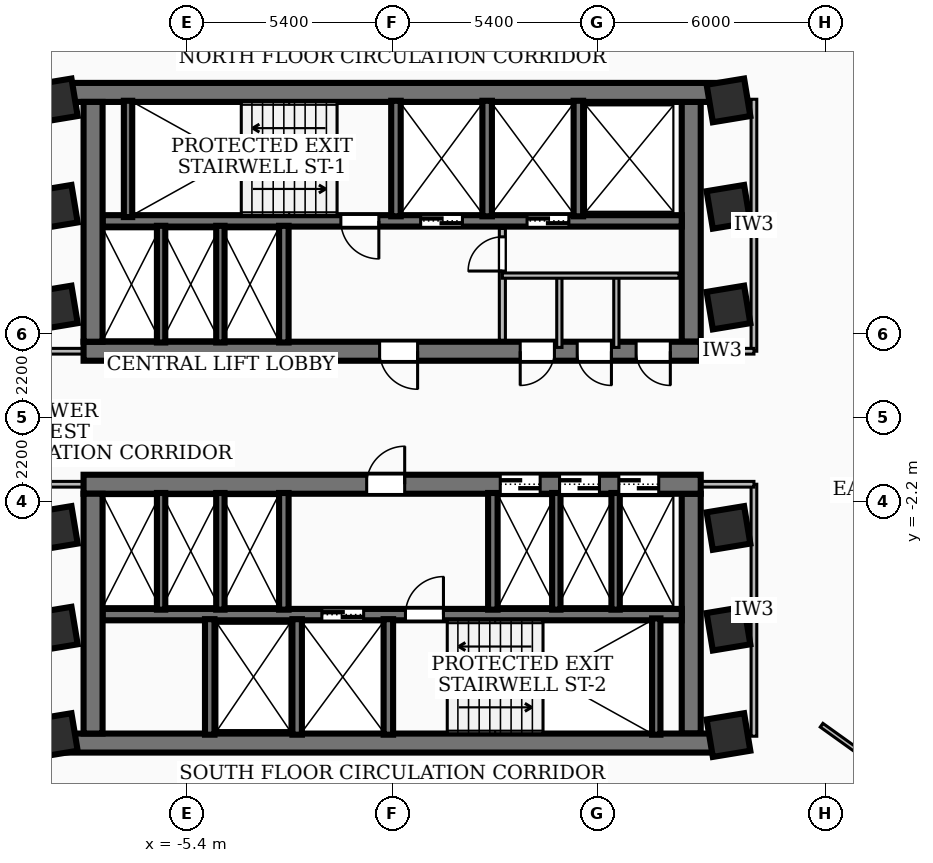
"""IFC4 building model, lengths in metres.
Left out: names, types, materials, properties, quantities, classifications, styles, units other than length and angle.
Written with IfcOpenShell. Run it as: python <this file> out.ifc"""

import sys

from ifc_helpers import new_model, si_unit, direction, frame, frame_2d, origin, origin_2d, place, context, subcontext, project, spatial, rectangle, extrude, element, fill, save


model = new_model("IFC4")
c1 = context("Model", 3, precision=1e-05, world=origin(), true_north=direction((0.0, 1.0)))
c2 = subcontext(c1, "Body", "Model", "MODEL_VIEW")
j1 = project(units=[si_unit("LENGTHUNIT", "METRE"), si_unit("PLANEANGLEUNIT", "RADIAN")], contexts=[c1])
p1 = place(None, origin())
s1 = spatial("IfcSite", under=j1, at=p1, CompositionType="ELEMENT")
p2 = place(p1, origin())
s2 = spatial("IfcBuilding", under=s1, at=p2, CompositionType="ELEMENT")
p3 = place(p2, frame((0.0, 0.0, 92.88)))
s3 = spatial("IfcBuildingStorey", under=s2, at=p3, CompositionType="ELEMENT", Elevation=92.88)
p4 = place(p3, frame((-8.78, 8.56, 0.0), z_axis=(0.0, 0.0, 1.0), x_axis=(1.0, 0.0, 0.0)))
e1 = element("IfcWall", 1, at=p4, inside=s3, PredefinedType="SHEAR", context=c2, shape_type="SweptSolid", body=[
    extrude(rectangle(XDim=17.56, YDim=0.5, at=frame_2d((8.78, 0.0))), origin(), (0.0, 0.0, 1.0), 3.34),
])
p5 = place(p3, frame((8.12, 1.75, 0.0), z_axis=(0.0, 0.0, 1.0), x_axis=(-1.0, 0.0, 0.0)))
e2 = element("IfcWall", 2, at=p5, inside=s3, PredefinedType="SHEAR", context=c2, shape_type="SweptSolid", body=[
    extrude(rectangle(XDim=16.24, YDim=0.5, at=frame_2d((8.12, 0.0))), origin(), (0.0, 0.0, 1.0), 3.34),
])
p6 = place(p5, frame((7.45, 0.0, 0.0)))
e3 = element("IfcOpeningElement", 3, at=p6, cuts=e2, PredefinedType="OPENING", context=c2, shape_type="SweptSolid", body=[
    extrude(rectangle(XDim=1.0, YDim=2.1, at=frame_2d((0.5, 1.05))), frame((0.0, 0.26, 0.0), z_axis=(0.0, -1.0, 0.0), x_axis=(1.0, 0.0, 0.0)), (0.0, 0.0, 1.0), 0.52),
])
p7 = place(p5, frame((3.85, 0.0, 0.0)))
e4 = element("IfcOpeningElement", 4, at=p7, cuts=e2, PredefinedType="OPENING", context=c2, shape_type="SweptSolid", body=[
    extrude(rectangle(XDim=0.9, YDim=2.06, at=frame_2d((0.45, 1.03))), frame((0.0, 0.26, 0.0), z_axis=(0.0, -1.0, 0.0), x_axis=(1.0, 0.0, 0.0)), (0.0, 0.0, 1.0), 0.52),
])
p8 = place(p5, frame((2.35, 0.0, 0.0)))
e5 = element("IfcOpeningElement", 5, at=p8, cuts=e2, PredefinedType="OPENING", context=c2, shape_type="SweptSolid", body=[
    extrude(rectangle(XDim=0.9, YDim=2.06, at=frame_2d((0.45, 1.03))), frame((0.0, 0.26, 0.0), z_axis=(0.0, -1.0, 0.0), x_axis=(1.0, 0.0, 0.0)), (0.0, 0.0, 1.0), 0.52),
])
p9 = place(p5, frame((0.8, 0.0, 0.0)))
e6 = element("IfcOpeningElement", 6, at=p9, cuts=e2, PredefinedType="OPENING", context=c2, shape_type="SweptSolid", body=[
    extrude(rectangle(XDim=0.9, YDim=2.06, at=frame_2d((0.45, 1.03))), frame((0.0, 0.26, 0.0), z_axis=(0.0, -1.0, 0.0), x_axis=(1.0, 0.0, 0.0)), (0.0, 0.0, 1.0), 0.52),
])
for number, where, z_axis, x_axis in (
    (7, (-7.87, 2.0, 0.0), (0.0, 0.0, 1.0), (0.0, 1.0, 0.0)),
    (8, (7.87, 8.31, 0.0), (0.0, 0.0, 1.0), (0.0, -1.0, 0.0)),
):
    element("IfcWall", number, at=place(p3, frame(where, z_axis=z_axis, x_axis=x_axis)), inside=s3, PredefinedType="SHEAR", context=c2, shape_type="SweptSolid", body=[
        extrude(rectangle(XDim=6.31, YDim=0.5, at=frame_2d((3.155, 0.0))), origin(), (0.0, 0.0, 1.0), 3.34),
    ])
p10 = place(p3, frame((7.62, 5.18, 0.0), z_axis=(0.0, 0.0, 1.0), x_axis=(-1.0, 0.0, 0.0)))
e9 = element("IfcWall", 9, at=p10, inside=s3, PredefinedType="SOLIDWALL", context=c2, shape_type="SweptSolid", body=[
    extrude(rectangle(XDim=15.24, YDim=0.3, at=frame_2d((7.62, 0.0))), origin(), (0.0, 0.0, 1.0), 3.34),
])
p11 = place(p10, frame((5.77, 0.0, 0.0)))
e10 = element("IfcOpeningElement", 10, at=p11, cuts=e9, PredefinedType="OPENING", context=c2, shape_type="SweptSolid", body=[
    extrude(rectangle(XDim=1.1, YDim=2.15, at=frame_2d((0.55, 1.075))), frame((0.0, 0.16, 0.0), z_axis=(0.0, -1.0, 0.0), x_axis=(1.0, 0.0, 0.0)), (0.0, 0.0, 1.0), 0.32),
])
p12 = place(p10, frame((2.97, 0.0, 0.0)))
e11 = element("IfcOpeningElement", 11, at=p12, cuts=e9, PredefinedType="OPENING", context=c2, shape_type="SweptSolid", body=[
    extrude(rectangle(XDim=1.1, YDim=2.15, at=frame_2d((0.55, 1.075))), frame((0.0, 0.16, 0.0), z_axis=(0.0, -1.0, 0.0), x_axis=(1.0, 0.0, 0.0)), (0.0, 0.0, 1.0), 0.32),
])
p13 = place(p10, frame((7.97, 0.0, 0.0)))
e12 = element("IfcOpeningElement", 12, at=p13, cuts=e9, PredefinedType="OPENING", context=c2, shape_type="SweptSolid", body=[
    extrude(rectangle(XDim=1.0, YDim=2.1, at=frame_2d((0.5, 1.05))), frame((0.0, 0.16, 0.0), z_axis=(0.0, -1.0, 0.0), x_axis=(1.0, 0.0, 0.0)), (0.0, 0.0, 1.0), 0.32),
])
p14 = place(p3, frame((8.78, -8.56, 0.0), z_axis=(0.0, 0.0, 1.0), x_axis=(-1.0, 0.0, 0.0)))
e13 = element("IfcWall", 13, at=p14, inside=s3, PredefinedType="SHEAR", context=c2, shape_type="SweptSolid", body=[
    extrude(rectangle(XDim=17.56, YDim=0.5, at=frame_2d((8.78, 0.0))), origin(), (0.0, 0.0, 1.0), 3.34),
])
p15 = place(p3, frame((-8.12, -1.75, 0.0), z_axis=(0.0, 0.0, 1.0), x_axis=(1.0, 0.0, 0.0)))
e14 = element("IfcWall", 14, at=p15, inside=s3, PredefinedType="SHEAR", context=c2, shape_type="SweptSolid", body=[
    extrude(rectangle(XDim=16.24, YDim=0.5, at=frame_2d((8.12, 0.0))), origin(), (0.0, 0.0, 1.0), 3.34),
])
p16 = place(p15, frame((7.45, 0.0, 0.0)))
e15 = element("IfcOpeningElement", 15, at=p16, cuts=e14, PredefinedType="OPENING", context=c2, shape_type="SweptSolid", body=[
    extrude(rectangle(XDim=1.0, YDim=2.1, at=frame_2d((0.5, 1.05))), frame((0.0, 0.26, 0.0), z_axis=(0.0, -1.0, 0.0), x_axis=(1.0, 0.0, 0.0)), (0.0, 0.0, 1.0), 0.52),
])
p17 = place(p15, frame((10.965, 0.0, 0.0)))
e16 = element("IfcOpeningElement", 16, at=p17, cuts=e14, PredefinedType="OPENING", context=c2, shape_type="SweptSolid", body=[
    extrude(rectangle(XDim=1.05, YDim=2.15, at=frame_2d((0.525, 1.075))), frame((0.0, 0.26, 0.0), z_axis=(0.0, -1.0, 0.0), x_axis=(1.0, 0.0, 0.0)), (0.0, 0.0, 1.0), 0.52),
])
p18 = place(p15, frame((12.525, 0.0, 0.0)))
e17 = element("IfcOpeningElement", 17, at=p18, cuts=e14, PredefinedType="OPENING", context=c2, shape_type="SweptSolid", body=[
    extrude(rectangle(XDim=1.05, YDim=2.15, at=frame_2d((0.525, 1.075))), frame((0.0, 0.26, 0.0), z_axis=(0.0, -1.0, 0.0), x_axis=(1.0, 0.0, 0.0)), (0.0, 0.0, 1.0), 0.52),
])
p19 = place(p15, frame((14.085, 0.0, 0.0)))
e18 = element("IfcOpeningElement", 18, at=p19, cuts=e14, PredefinedType="OPENING", context=c2, shape_type="SweptSolid", body=[
    extrude(rectangle(XDim=1.05, YDim=2.15, at=frame_2d((0.525, 1.075))), frame((0.0, 0.26, 0.0), z_axis=(0.0, -1.0, 0.0), x_axis=(1.0, 0.0, 0.0)), (0.0, 0.0, 1.0), 0.52),
])
for number, where, z_axis, x_axis in (
    (19, (-7.87, -8.31, 0.0), (0.0, 0.0, 1.0), (0.0, 1.0, 0.0)),
    (20, (7.87, -2.0, 0.0), (0.0, 0.0, 1.0), (0.0, -1.0, 0.0)),
):
    element("IfcWall", number, at=place(p3, frame(where, z_axis=z_axis, x_axis=x_axis)), inside=s3, PredefinedType="SHEAR", context=c2, shape_type="SweptSolid", body=[
        extrude(rectangle(XDim=6.31, YDim=0.5, at=frame_2d((3.155, 0.0))), origin(), (0.0, 0.0, 1.0), 3.34),
    ])
p20 = place(p3, frame((-7.62, -5.18, 0.0), z_axis=(0.0, 0.0, 1.0), x_axis=(1.0, 0.0, 0.0)))
e21 = element("IfcWall", 21, at=p20, inside=s3, PredefinedType="SOLIDWALL", context=c2, shape_type="SweptSolid", body=[
    extrude(rectangle(XDim=15.24, YDim=0.3, at=frame_2d((7.62, 0.0))), origin(), (0.0, 0.0, 1.0), 3.34),
])
p21 = place(p20, frame((5.77, 0.0, 0.0)))
e22 = element("IfcOpeningElement", 22, at=p21, cuts=e21, PredefinedType="OPENING", context=c2, shape_type="SweptSolid", body=[
    extrude(rectangle(XDim=1.1, YDim=2.15, at=frame_2d((0.55, 1.075))), frame((0.0, 0.16, 0.0), z_axis=(0.0, -1.0, 0.0), x_axis=(1.0, 0.0, 0.0)), (0.0, 0.0, 1.0), 0.32),
])
p22 = place(p20, frame((7.97, 0.0, 0.0)))
e23 = element("IfcOpeningElement", 23, at=p22, cuts=e21, PredefinedType="OPENING", context=c2, shape_type="SweptSolid", body=[
    extrude(rectangle(XDim=1.0, YDim=2.1, at=frame_2d((0.5, 1.05))), frame((0.0, 0.16, 0.0), z_axis=(0.0, -1.0, 0.0), x_axis=(1.0, 0.0, 0.0)), (0.0, 0.0, 1.0), 0.32),
])
for number, where, z_axis, x_axis in (
    (24, (-6.95, 5.28, 0.0), (0.0, 0.0, 1.0), (0.0, 1.0, 0.0)),
    (25, (6.95, -8.34, 0.0), (0.0, 0.0, 1.0), (0.0, 1.0, 0.0)),
):
    element("IfcWall", number, at=place(p3, frame(where, z_axis=z_axis, x_axis=x_axis)), inside=s3, PredefinedType="SOLIDWALL", context=c2, shape_type="SweptSolid", body=[
        extrude(rectangle(XDim=3.06, YDim=0.22, at=frame_2d((1.53, 0.0))), origin(), (0.0, 0.0, 1.0), 3.34),
    ])
for number, where, z_axis, x_axis in (
    (26, (0.1, 5.3, 0.0), (0.0, 0.0, 1.0), (0.0, 1.0, 0.0)),
    (27, (2.5, 5.3, 0.0), (0.0, 0.0, 1.0), (0.0, 1.0, 0.0)),
    (28, (4.9, 5.3, 0.0), (0.0, 0.0, 1.0), (0.0, 1.0, 0.0)),
):
    element("IfcWall", number, at=place(p3, frame(where, z_axis=z_axis, x_axis=x_axis)), inside=s3, PredefinedType="SOLIDWALL", context=c2, shape_type="SweptSolid", body=[
        extrude(rectangle(XDim=3.04, YDim=0.25, at=frame_2d((1.52, 0.0))), origin(), (0.0, 0.0, 1.0), 3.34),
    ])
p23 = place(p3, frame((-2.85, 1.98, 0.0), z_axis=(0.0, 0.0, 1.0), x_axis=(0.0, 1.0, 0.0)))
e29 = element("IfcWall", 29, at=p23, inside=s3, PredefinedType="SOLIDWALL", context=c2, shape_type="SweptSolid", body=[
    extrude(rectangle(XDim=3.07, YDim=0.25, at=frame_2d((1.535, 0.0))), origin(), (0.0, 0.0, 1.0), 3.34),
])
for number, where, z_axis, x_axis in (
    (30, (-0.1, -8.34, 0.0), (0.0, 0.0, 1.0), (0.0, 1.0, 0.0)),
    (31, (-2.5, -8.34, 0.0), (0.0, 0.0, 1.0), (0.0, 1.0, 0.0)),
    (32, (-4.8, -8.34, 0.0), (0.0, 0.0, 1.0), (0.0, 1.0, 0.0)),
):
    element("IfcWall", number, at=place(p3, frame(where, z_axis=z_axis, x_axis=x_axis)), inside=s3, PredefinedType="SOLIDWALL", context=c2, shape_type="SweptSolid", body=[
        extrude(rectangle(XDim=3.04, YDim=0.25, at=frame_2d((1.52, 0.0))), origin(), (0.0, 0.0, 1.0), 3.34),
    ])
for number, where, z_axis, x_axis in (
    (33, (-2.85, -5.05, 0.0), (0.0, 0.0, 1.0), (0.0, 1.0, 0.0)),
    (34, (2.65, -5.05, 0.0), (0.0, 0.0, 1.0), (0.0, 1.0, 0.0)),
):
    element("IfcWall", number, at=place(p3, frame(where, z_axis=z_axis, x_axis=x_axis)), inside=s3, PredefinedType="SOLIDWALL", context=c2, shape_type="SweptSolid", body=[
        extrude(rectangle(XDim=3.07, YDim=0.25, at=frame_2d((1.535, 0.0))), origin(), (0.0, 0.0, 1.0), 3.34),
    ])
for number, where, z_axis, x_axis in (
    (35, (-6.08, 1.98, 0.0), (0.0, 0.0, 1.0), (0.0, 1.0, 0.0)),
    (36, (-4.52, 1.98, 0.0), (0.0, 0.0, 1.0), (0.0, 1.0, 0.0)),
    (37, (4.32, -5.05, 0.0), (0.0, 0.0, 1.0), (0.0, 1.0, 0.0)),
    (38, (5.88, -5.05, 0.0), (0.0, 0.0, 1.0), (0.0, 1.0, 0.0)),
    (39, (-6.08, -5.05, 0.0), (0.0, 0.0, 1.0), (0.0, 1.0, 0.0)),
    (40, (-4.52, -5.05, 0.0), (0.0, 0.0, 1.0), (0.0, 1.0, 0.0)),
):
    element("IfcWall", number, at=place(p3, frame(where, z_axis=z_axis, x_axis=x_axis)), inside=s3, PredefinedType="SOLIDWALL", context=c2, shape_type="SweptSolid", body=[
        extrude(rectangle(XDim=3.07, YDim=0.22, at=frame_2d((1.535, 0.0))), origin(), (0.0, 0.0, 1.0), 3.34),
    ])
for number, where, z_axis, x_axis in (
    (41, (-8.85, -5.55, 0.0), (0.0, 0.0, 1.0), (0.987, 0.163, 0.0)),
    (42, (-8.85, -2.9, 0.0), (0.0, 0.0, 1.0), (0.987, 0.163, 0.0)),
    (43, (-8.85, 2.9, 0.0), (0.0, 0.0, 1.0), (0.987, 0.163, 0.0)),
    (44, (-8.85, 5.55, 0.0), (0.0, 0.0, 1.0), (0.987, 0.163, 0.0)),
    (45, (8.85, -5.55, 0.0), (0.0, 0.0, 1.0), (0.987, 0.163, 0.0)),
    (46, (8.85, -2.9, 0.0), (0.0, 0.0, 1.0), (0.987, 0.163, 0.0)),
    (47, (8.85, 2.9, 0.0), (0.0, 0.0, 1.0), (0.987, 0.163, 0.0)),
    (48, (8.85, 5.55, 0.0), (0.0, 0.0, 1.0), (0.987, 0.163, 0.0)),
    (49, (-8.85, 8.35, 0.0), (0.0, 0.0, 1.0), (0.987, 0.163, 0.0)),
    (50, (8.85, -8.35, 0.0), (0.0, 0.0, 1.0), (0.987, 0.163, 0.0)),
    (51, (8.85, 8.35, 0.0), (0.0, 0.0, 1.0), (0.987, 0.163, 0.0)),
    (52, (-8.85, -8.35, 0.0), (0.0, 0.0, 1.0), (0.987, 0.163, 0.0)),
):
    element("IfcColumn", number, at=place(p3, frame(where, z_axis=z_axis, x_axis=x_axis)), inside=s3, PredefinedType="COLUMN", context=c2, shape_type="SweptSolid", body=[
        extrude(rectangle(XDim=1.0, YDim=1.0, at=origin_2d()), origin(), (0.0, 0.0, 1.0), 3.6),
    ])
p24 = place(p3, frame((12.12, 15.142, 0.0), z_axis=(0.0, 0.0, 1.0), x_axis=(0.163241835244, -0.986586085056, 0.0)))
e53 = element("IfcWall", 53, at=p24, inside=s3, PredefinedType="SOLIDWALL", context=c2, shape_type="SweptSolid", body=[
    extrude(rectangle(XDim=6.775, YDim=0.24, at=frame_2d((3.387, 0.0))), origin(), (0.0, 0.0, 1.0), 2.644),
])
p25 = place(p3, frame((2.9, 2.04, 0.0), z_axis=(0.0, 0.0, 1.0), x_axis=(0.0, 1.0, 0.0)))
e54 = element("IfcWall", 54, at=p25, inside=s3, PredefinedType="PARTITIONING", context=c2, shape_type="SweptSolid", body=[
    extrude(rectangle(XDim=2.94, YDim=0.16, at=frame_2d((1.47, 0.0))), origin(), (0.0, 0.0, 1.0), 2.405),
])
p26 = place(p25, frame((1.82, 0.0, 0.0)))
e55 = element("IfcOpeningElement", 55, at=p26, cuts=e54, PredefinedType="OPENING", context=c2, shape_type="SweptSolid", body=[
    extrude(rectangle(XDim=0.9, YDim=2.06, at=frame_2d((0.45, 1.03))), frame((0.0, 0.09, 0.0), z_axis=(0.0, -1.0, 0.0), x_axis=(1.0, 0.0, 0.0)), (0.0, 0.0, 1.0), 0.18),
])
p27 = place(p3, frame((2.9, 3.74, 0.0), z_axis=(0.0, 0.0, 1.0), x_axis=(1.0, 0.0, 0.0)))
e56 = element("IfcWall", 56, at=p27, inside=s3, PredefinedType="PARTITIONING", context=c2, shape_type="SweptSolid", body=[
    extrude(rectangle(XDim=4.65, YDim=0.138, at=frame_2d((2.325, 0.0))), origin(), (0.0, 0.0, 1.0), 3.34),
])
for number, where, z_axis, x_axis in (
    (57, (4.4, 1.85, 0.0), (0.0, 0.0, 1.0), (0.0, 1.0, 0.0)),
    (58, (5.9, 1.85, 0.0), (0.0, 0.0, 1.0), (0.0, 1.0, 0.0)),
):
    element("IfcWall", number, at=place(p3, frame(where, z_axis=z_axis, x_axis=x_axis)), inside=s3, PredefinedType="PARTITIONING", context=c2, shape_type="SweptSolid", body=[
        extrude(rectangle(XDim=1.89, YDim=0.138, at=frame_2d((0.945, 0.0))), origin(), (0.0, 0.0, 1.0), 2.405),
    ])
for number, where, z_axis, x_axis in (
    (59, (-7.85, 1.75, 0.0), (0.0, 0.0, 1.0), (-1.0, 0.0, 0.0)),
    (60, (-7.85, -1.75, 0.0), (0.0, 0.0, 1.0), (-1.0, 0.0, 0.0)),
):
    element("IfcWall", number, at=place(p3, frame(where, z_axis=z_axis, x_axis=x_axis)), inside=s3, PredefinedType="PARTITIONING", context=c2, shape_type="SweptSolid", body=[
        extrude(rectangle(XDim=1.67, YDim=0.15, at=frame_2d((0.835, 0.0))), origin(), (0.0, 0.0, 1.0), 2.405),
    ])
p28 = place(p3, frame((9.52, 1.75, 0.0), z_axis=(0.0, 0.0, 1.0), x_axis=(0.0, 1.0, 0.0)))
e61 = element("IfcWall", 61, at=p28, inside=s3, PredefinedType="PARTITIONING", context=c2, shape_type="SweptSolid", body=[
    extrude(rectangle(XDim=6.63, YDim=0.15, at=frame_2d((3.315, 0.0))), origin(), (0.0, 0.0, 1.0), 2.486),
])
p29 = place(p3, frame((7.85, 1.75, 0.0), z_axis=(0.0, 0.0, 1.0), x_axis=(1.0, 0.0, 0.0)))
e62 = element("IfcWall", 62, at=p29, inside=s3, PredefinedType="PARTITIONING", context=c2, shape_type="SweptSolid", body=[
    extrude(rectangle(XDim=1.67, YDim=0.15, at=frame_2d((0.835, 0.0))), origin(), (0.0, 0.0, 1.0), 2.405),
])
p30 = place(p3, frame((9.52, -8.38, 0.0), z_axis=(0.0, 0.0, 1.0), x_axis=(0.0, 1.0, 0.0)))
e63 = element("IfcWall", 63, at=p30, inside=s3, PredefinedType="PARTITIONING", context=c2, shape_type="SweptSolid", body=[
    extrude(rectangle(XDim=6.63, YDim=0.15, at=frame_2d((3.315, 0.0))), origin(), (0.0, 0.0, 1.0), 2.486),
])
p31 = place(p3, frame((7.85, -1.75, 0.0), z_axis=(0.0, 0.0, 1.0), x_axis=(1.0, 0.0, 0.0)))
e64 = element("IfcWall", 64, at=p31, inside=s3, PredefinedType="PARTITIONING", context=c2, shape_type="SweptSolid", body=[
    extrude(rectangle(XDim=1.67, YDim=0.15, at=frame_2d((0.835, 0.0))), origin(), (0.0, 0.0, 1.0), 2.405),
])
p32 = place(p3, frame((11.3, -8.09, 0.0), z_axis=(0.0, 0.0, 1.0), x_axis=(0.813131268368, -0.582080355623, 0.0)))
e65 = element("IfcWall", 65, at=p32, inside=s3, PredefinedType="PARTITIONING", context=c2, shape_type="SweptSolid", body=[
    extrude(rectangle(XDim=5.757, YDim=0.12, at=frame_2d((2.878, 0.0))), origin(), (0.0, 0.0, 1.0), 3.34),
])
p33 = place(p6, origin())
e66 = element("IfcDoor", 66, at=p33, inside=s3, OperationType="SINGLE_SWING_LEFT", PredefinedType="DOOR", context=c2, shape_type="SweptSolid", body=[
    extrude(rectangle(XDim=1.0, YDim=2.1, at=frame_2d((0.5, 1.05))), frame((0.0, 0.025, 0.0), z_axis=(0.0, -1.0, 0.0), x_axis=(1.0, 0.0, 0.0)), (0.0, 0.0, 1.0), 0.05),
])
fill(e3, e66)
p34 = place(p16, origin())
e67 = element("IfcDoor", 67, at=p34, inside=s3, OperationType="SINGLE_SWING_RIGHT", PredefinedType="DOOR", context=c2, shape_type="SweptSolid", body=[
    extrude(rectangle(XDim=1.0, YDim=2.1, at=frame_2d((0.5, 1.05))), frame((0.0, 0.025, 0.0), z_axis=(0.0, -1.0, 0.0), x_axis=(1.0, 0.0, 0.0)), (0.0, 0.0, 1.0), 0.05),
])
fill(e15, e67)
p35 = place(p11, origin())
e68 = element("IfcDoor", 68, at=p35, inside=s3, OperationType="DOUBLE_DOOR_SLIDING", PredefinedType="DOOR", context=c2, shape_type="SweptSolid", body=[
    extrude(rectangle(XDim=1.1, YDim=2.15, at=frame_2d((0.55, 1.075))), frame((0.0, 0.025, 0.0), z_axis=(0.0, -1.0, 0.0), x_axis=(1.0, 0.0, 0.0)), (0.0, 0.0, 1.0), 0.05),
])
fill(e10, e68)
p36 = place(p12, origin())
e69 = element("IfcDoor", 69, at=p36, inside=s3, OperationType="DOUBLE_DOOR_SLIDING", PredefinedType="DOOR", context=c2, shape_type="SweptSolid", body=[
    extrude(rectangle(XDim=1.1, YDim=2.15, at=frame_2d((0.55, 1.075))), frame((0.0, 0.025, 0.0), z_axis=(0.0, -1.0, 0.0), x_axis=(1.0, 0.0, 0.0)), (0.0, 0.0, 1.0), 0.05),
])
fill(e11, e69)
p37 = place(p13, origin())
e70 = element("IfcDoor", 70, at=p37, inside=s3, OperationType="SINGLE_SWING_LEFT", PredefinedType="DOOR", context=c2, shape_type="SweptSolid", body=[
    extrude(rectangle(XDim=1.0, YDim=2.1, at=frame_2d((0.5, 1.05))), frame((0.0, 0.025, 0.0), z_axis=(0.0, -1.0, 0.0), x_axis=(1.0, 0.0, 0.0)), (0.0, 0.0, 1.0), 0.05),
])
fill(e12, e70)
p38 = place(p21, origin())
e71 = element("IfcDoor", 71, at=p38, inside=s3, OperationType="DOUBLE_DOOR_SLIDING", PredefinedType="DOOR", context=c2, shape_type="SweptSolid", body=[
    extrude(rectangle(XDim=1.1, YDim=2.15, at=frame_2d((0.55, 1.075))), frame((0.0, 0.025, 0.0), z_axis=(0.0, -1.0, 0.0), x_axis=(1.0, 0.0, 0.0)), (0.0, 0.0, 1.0), 0.05),
])
fill(e22, e71)
p39 = place(p22, origin())
e72 = element("IfcDoor", 72, at=p39, inside=s3, OperationType="SINGLE_SWING_RIGHT", PredefinedType="DOOR", context=c2, shape_type="SweptSolid", body=[
    extrude(rectangle(XDim=1.0, YDim=2.1, at=frame_2d((0.5, 1.05))), frame((0.0, 0.025, 0.0), z_axis=(0.0, -1.0, 0.0), x_axis=(1.0, 0.0, 0.0)), (0.0, 0.0, 1.0), 0.05),
])
fill(e23, e72)
p40 = place(p17, origin())
e73 = element("IfcDoor", 73, at=p40, inside=s3, OperationType="DOUBLE_DOOR_SLIDING", PredefinedType="DOOR", context=c2, shape_type="SweptSolid", body=[
    extrude(rectangle(XDim=1.05, YDim=2.15, at=frame_2d((0.525, 1.075))), frame((0.0, 0.025, 0.0), z_axis=(0.0, -1.0, 0.0), x_axis=(1.0, 0.0, 0.0)), (0.0, 0.0, 1.0), 0.05),
])
fill(e16, e73)
p41 = place(p18, origin())
e74 = element("IfcDoor", 74, at=p41, inside=s3, OperationType="DOUBLE_DOOR_SLIDING", PredefinedType="DOOR", context=c2, shape_type="SweptSolid", body=[
    extrude(rectangle(XDim=1.05, YDim=2.15, at=frame_2d((0.525, 1.075))), frame((0.0, 0.025, 0.0), z_axis=(0.0, -1.0, 0.0), x_axis=(1.0, 0.0, 0.0)), (0.0, 0.0, 1.0), 0.05),
])
fill(e17, e74)
p42 = place(p19, origin())
e75 = element("IfcDoor", 75, at=p42, inside=s3, OperationType="DOUBLE_DOOR_SLIDING", PredefinedType="DOOR", context=c2, shape_type="SweptSolid", body=[
    extrude(rectangle(XDim=1.05, YDim=2.15, at=frame_2d((0.525, 1.075))), frame((0.0, 0.025, 0.0), z_axis=(0.0, -1.0, 0.0), x_axis=(1.0, 0.0, 0.0)), (0.0, 0.0, 1.0), 0.05),
])
fill(e18, e75)
p43 = place(p7, origin())
e76 = element("IfcDoor", 76, at=p43, inside=s3, OperationType="SINGLE_SWING_RIGHT", PredefinedType="DOOR", context=c2, shape_type="SweptSolid", body=[
    extrude(rectangle(XDim=0.9, YDim=2.06, at=frame_2d((0.45, 1.03))), frame((0.0, 0.025, 0.0), z_axis=(0.0, -1.0, 0.0), x_axis=(1.0, 0.0, 0.0)), (0.0, 0.0, 1.0), 0.05),
])
fill(e4, e76)
p44 = place(p8, origin())
e77 = element("IfcDoor", 77, at=p44, inside=s3, OperationType="SINGLE_SWING_LEFT", PredefinedType="DOOR", context=c2, shape_type="SweptSolid", body=[
    extrude(rectangle(XDim=0.9, YDim=2.06, at=frame_2d((0.45, 1.03))), frame((0.0, 0.025, 0.0), z_axis=(0.0, -1.0, 0.0), x_axis=(1.0, 0.0, 0.0)), (0.0, 0.0, 1.0), 0.05),
])
fill(e5, e77)
p45 = place(p9, origin())
e78 = element("IfcDoor", 78, at=p45, inside=s3, OperationType="SINGLE_SWING_LEFT", PredefinedType="DOOR", context=c2, shape_type="SweptSolid", body=[
    extrude(rectangle(XDim=0.9, YDim=2.06, at=frame_2d((0.45, 1.03))), frame((0.0, 0.025, 0.0), z_axis=(0.0, -1.0, 0.0), x_axis=(1.0, 0.0, 0.0)), (0.0, 0.0, 1.0), 0.05),
])
fill(e6, e78)
p46 = place(p26, origin())
e79 = element("IfcDoor", 79, at=p46, inside=s3, OperationType="SINGLE_SWING_LEFT", PredefinedType="DOOR", context=c2, shape_type="SweptSolid", body=[
    extrude(rectangle(XDim=0.9, YDim=2.06, at=frame_2d((0.45, 1.03))), frame((0.0, 0.025, 0.0), z_axis=(0.0, -1.0, 0.0), x_axis=(1.0, 0.0, 0.0)), (0.0, 0.0, 1.0), 0.05),
])
fill(e55, e79)
save(model, sys.argv[1])
